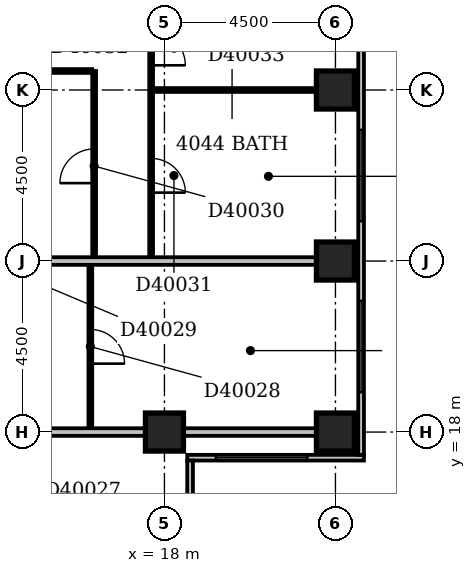
"""IFC4 building model, lengths in metres.
Left out: names, types, materials, properties, quantities, classifications, styles, units other than length and angle.
Written with IfcOpenShell. Run it as: python <this file> out.ifc"""

import sys

from ifc_helpers import new_model, si_unit, direction, frame, frame_2d, origin, origin_2d, place, context, subcontext, project, spatial, rectangle, extrude, element, fill, save


model = new_model("IFC4")
c1 = context("Model", 3, precision=1e-05, world=origin(), true_north=direction((0.0, 1.0)))
c2 = subcontext(c1, "Body", "Model", "MODEL_VIEW")
j1 = project(units=[si_unit("LENGTHUNIT", "METRE"), si_unit("PLANEANGLEUNIT", "RADIAN")], contexts=[c1])
p1 = place(None, origin())
s1 = spatial("IfcSite", under=j1, at=p1, CompositionType="ELEMENT")
p2 = place(p1, origin())
s2 = spatial("IfcBuilding", under=s1, at=p2, CompositionType="ELEMENT")
p3 = place(p2, frame((0.0, 0.0, 159.2)))
s3 = spatial("IfcBuildingStorey", under=s2, at=p3, CompositionType="ELEMENT", Elevation=159.2)
for number, where, z_axis, x_axis in (
    (1, (18.0, 18.0, -0.3), (0.0, 0.0, 1.0), (1.0, 0.0, 0.0)),
    (2, (22.5, 18.0, -0.3), (0.0, 0.0, 1.0), (1.0, 0.0, 0.0)),
    (3, (22.5, 22.5, -0.3), (0.0, 0.0, 1.0), (1.0, 0.0, 0.0)),
    (4, (22.5, 27.0, -0.3), (0.0, 0.0, 1.0), (1.0, 0.0, 0.0)),
):
    element("IfcColumn", number, at=place(p3, frame(where, z_axis=z_axis, x_axis=x_axis)), inside=s3, PredefinedType="COLUMN", context=c2, shape_type="SweptSolid", body=[
        extrude(rectangle(XDim=1.0, YDim=1.0, at=origin_2d()), origin(), (0.0, 0.0, 1.0), 3.6),
    ])
p4 = place(p3, frame((18.675, 8.4, 0.0), z_axis=(0.0, 0.0, 1.0), x_axis=(0.0, 1.0, 0.0)))
e5 = element("IfcWall", 5, at=p4, inside=s3, PredefinedType="STANDARD", context=c2, shape_type="SweptSolid", body=[
    extrude(rectangle(XDim=8.85, YDim=0.15, at=frame_2d((4.425, 0.0))), origin(), (0.0, 0.0, 1.0), 2.7),
])
p5 = place(p4, frame((1.65, 0.0, 0.6)))
e6 = element("IfcOpeningElement", 6, at=p5, cuts=e5, PredefinedType="OPENING", context=c2, shape_type="SweptSolid", body=[
    extrude(rectangle(XDim=2.4, YDim=1.8, at=frame_2d((1.2, 0.9))), frame((0.0, 0.087, 0.0), z_axis=(0.0, -1.0, 0.0), x_axis=(1.0, 0.0, 0.0)), (0.0, 0.0, 1.0), 0.174),
])
p6 = place(p4, frame((5.832, 0.0, 0.6)))
e7 = element("IfcOpeningElement", 7, at=p6, cuts=e5, PredefinedType="OPENING", context=c2, shape_type="SweptSolid", body=[
    extrude(rectangle(XDim=1.5, YDim=1.8, at=frame_2d((0.75, 0.9))), frame((0.0, 0.087, 0.0), z_axis=(0.0, -1.0, 0.0), x_axis=(1.0, 0.0, 0.0)), (0.0, 0.0, 1.0), 0.174),
])
p7 = place(p3, frame((18.6, 17.325, 0.0), z_axis=(0.0, 0.0, 1.0), x_axis=(1.0, 0.0, 0.0)))
e8 = element("IfcWall", 8, at=p7, inside=s3, PredefinedType="STANDARD", context=c2, shape_type="SweptSolid", body=[
    extrude(rectangle(XDim=4.65, YDim=0.15, at=frame_2d((2.325, 0.0))), origin(), (0.0, 0.0, 1.0), 2.7),
])
p8 = place(p7, frame((0.757, 0.0, 0.6)))
e9 = element("IfcOpeningElement", 9, at=p8, cuts=e8, PredefinedType="OPENING", context=c2, shape_type="SweptSolid", body=[
    extrude(rectangle(XDim=2.4, YDim=1.8, at=frame_2d((1.2, 0.9))), frame((0.0, 0.087, 0.0), z_axis=(0.0, -1.0, 0.0), x_axis=(1.0, 0.0, 0.0)), (0.0, 0.0, 1.0), 0.174),
])
p9 = place(p3, frame((23.175, 17.4, 0.0), z_axis=(0.0, 0.0, 1.0), x_axis=(0.0, 1.0, 0.0)))
e10 = element("IfcWall", 10, at=p9, inside=s3, PredefinedType="STANDARD", context=c2, shape_type="SweptSolid", body=[
    extrude(rectangle(XDim=17.85, YDim=0.15, at=frame_2d((8.925, 0.0))), origin(), (0.0, 0.0, 1.0), 2.7),
])
p10 = place(p9, frame((1.65, 0.0, 0.6)))
e11 = element("IfcOpeningElement", 11, at=p10, cuts=e10, PredefinedType="OPENING", context=c2, shape_type="SweptSolid", body=[
    extrude(rectangle(XDim=2.4, YDim=1.8, at=frame_2d((1.2, 0.9))), frame((0.0, 0.087, 0.0), z_axis=(0.0, -1.0, 0.0), x_axis=(1.0, 0.0, 0.0)), (0.0, 0.0, 1.0), 0.174),
])
p11 = place(p9, frame((6.15, 0.0, 0.6)))
e12 = element("IfcOpeningElement", 12, at=p11, cuts=e10, PredefinedType="OPENING", context=c2, shape_type="SweptSolid", body=[
    extrude(rectangle(XDim=2.4, YDim=1.8, at=frame_2d((1.2, 0.9))), frame((0.0, 0.087, 0.0), z_axis=(0.0, -1.0, 0.0), x_axis=(1.0, 0.0, 0.0)), (0.0, 0.0, 1.0), 0.174),
])
p12 = place(p9, frame((10.65, 0.0, 0.6)))
e13 = element("IfcOpeningElement", 13, at=p12, cuts=e10, PredefinedType="OPENING", context=c2, shape_type="SweptSolid", body=[
    extrude(rectangle(XDim=2.4, YDim=1.8, at=frame_2d((1.2, 0.9))), frame((0.0, 0.087, 0.0), z_axis=(0.0, -1.0, 0.0), x_axis=(1.0, 0.0, 0.0)), (0.0, 0.0, 1.0), 0.174),
])
p13 = place(p9, frame((14.82, 0.0, 0.6)))
e14 = element("IfcOpeningElement", 14, at=p13, cuts=e10, PredefinedType="OPENING", context=c2, shape_type="SweptSolid", body=[
    extrude(rectangle(XDim=0.45, YDim=1.8, at=frame_2d((0.225, 0.9))), frame((0.0, 0.087, 0.0), z_axis=(0.0, -1.0, 0.0), x_axis=(1.0, 0.0, 0.0)), (0.0, 0.0, 1.0), 0.174),
])
p14 = place(p3, frame((9.1, 18.0, 0.0), z_axis=(0.0, 0.0, 1.0), x_axis=(1.0, 0.0, 0.0)))
e15 = element("IfcWall", 15, at=p14, inside=s3, PredefinedType="PARTITIONING", context=c2, shape_type="SweptSolid", body=[
    extrude(rectangle(XDim=8.4, YDim=0.2, at=frame_2d((4.2, 0.0))), origin(), (0.0, 0.0, 1.0), 2.6),
])
p15 = place(p3, frame((18.5, 18.0, 0.0), z_axis=(0.0, 0.0, 1.0), x_axis=(1.0, 0.0, 0.0)))
e16 = element("IfcWall", 16, at=p15, inside=s3, PredefinedType="PARTITIONING", context=c2, shape_type="SweptSolid", body=[
    extrude(rectangle(XDim=3.5, YDim=0.2, at=frame_2d((1.75, 0.0))), origin(), (0.0, 0.0, 1.0), 2.7),
])
p16 = place(p3, frame((16.05, 18.1, 0.0), z_axis=(0.0, 0.0, 1.0), x_axis=(0.0, 1.0, 0.0)))
e17 = element("IfcWall", 17, at=p16, inside=s3, PredefinedType="PARTITIONING", context=c2, shape_type="SweptSolid", body=[
    extrude(rectangle(XDim=4.3, YDim=0.1, at=frame_2d((2.15, 0.0))), origin(), (0.0, 0.0, 1.0), 3.3),
])
p17 = place(p16, frame((1.7, 0.0, 0.0)))
e18 = element("IfcOpeningElement", 18, at=p17, cuts=e17, PredefinedType="OPENING", context=c2, shape_type="SweptSolid", body=[
    extrude(rectangle(XDim=0.9, YDim=2.1, at=frame_2d((0.45, 1.05))), frame((0.0, 0.062, 0.0), z_axis=(0.0, -1.0, 0.0), x_axis=(1.0, 0.0, 0.0)), (0.0, 0.0, 1.0), 0.124),
])
p18 = place(p3, frame((9.1, 22.5, 0.0), z_axis=(0.0, 0.0, 1.0), x_axis=(1.0, 0.0, 0.0)))
e19 = element("IfcWall", 19, at=p18, inside=s3, PredefinedType="PARTITIONING", context=c2, shape_type="SweptSolid", body=[
    extrude(rectangle(XDim=12.9, YDim=0.2, at=frame_2d((6.45, 0.0))), origin(), (0.0, 0.0, 1.0), 3.3),
])
p19 = place(p3, frame((16.15, 22.6, 0.0), z_axis=(0.0, 0.0, 1.0), x_axis=(0.0, 1.0, 0.0)))
e20 = element("IfcWall", 20, at=p19, inside=s3, PredefinedType="PARTITIONING", context=c2, shape_type="SweptSolid", body=[
    extrude(rectangle(XDim=4.9, YDim=0.1, at=frame_2d((2.45, 0.0))), origin(), (0.0, 0.0, 1.0), 3.3),
])
p20 = place(p19, frame((1.95, 0.0, 0.0)))
e21 = element("IfcOpeningElement", 21, at=p20, cuts=e20, PredefinedType="OPENING", context=c2, shape_type="SweptSolid", body=[
    extrude(rectangle(XDim=0.9, YDim=2.1, at=frame_2d((0.45, 1.05))), frame((0.0, 0.062, 0.0), z_axis=(0.0, -1.0, 0.0), x_axis=(1.0, 0.0, 0.0)), (0.0, 0.0, 1.0), 0.124),
])
p21 = place(p3, frame((17.65, 22.6, 0.0), z_axis=(0.0, 0.0, 1.0), x_axis=(0.0, 1.0, 0.0)))
e22 = element("IfcWall", 22, at=p21, inside=s3, PredefinedType="PARTITIONING", context=c2, shape_type="SweptSolid", body=[
    extrude(rectangle(XDim=8.8, YDim=0.1, at=frame_2d((4.4, 0.0))), origin(), (0.0, 0.0, 1.0), 3.3),
])
p22 = place(p21, frame((1.7, 0.0, 0.0)))
e23 = element("IfcOpeningElement", 23, at=p22, cuts=e22, PredefinedType="OPENING", context=c2, shape_type="SweptSolid", body=[
    extrude(rectangle(XDim=0.9, YDim=2.1, at=frame_2d((0.45, 1.05))), frame((0.0, 0.062, 0.0), z_axis=(0.0, -1.0, 0.0), x_axis=(1.0, 0.0, 0.0)), (0.0, 0.0, 1.0), 0.124),
])
p23 = place(p21, frame((5.05, 0.0, 0.0)))
e24 = element("IfcOpeningElement", 24, at=p23, cuts=e22, PredefinedType="OPENING", context=c2, shape_type="SweptSolid", body=[
    extrude(rectangle(XDim=0.9, YDim=2.1, at=frame_2d((0.45, 1.05))), frame((0.0, 0.062, 0.0), z_axis=(0.0, -1.0, 0.0), x_axis=(1.0, 0.0, 0.0)), (0.0, 0.0, 1.0), 0.124),
])
p24 = place(p3, frame((17.7, 27.0, 0.0), z_axis=(0.0, 0.0, 1.0), x_axis=(1.0, 0.0, 0.0)))
e25 = element("IfcWall", 25, at=p24, inside=s3, PredefinedType="PARTITIONING", context=c2, shape_type="SweptSolid", body=[
    extrude(rectangle(XDim=4.3, YDim=0.1, at=frame_2d((2.15, 0.0))), origin(), (0.0, 0.0, 1.0), 2.7),
])
p25 = place(p3, frame((9.1, 27.5, 0.0), z_axis=(0.0, 0.0, 1.0), x_axis=(1.0, 0.0, 0.0)))
e26 = element("IfcWall", 26, at=p25, inside=s3, PredefinedType="PARTITIONING", context=c2, shape_type="SweptSolid", body=[
    extrude(rectangle(XDim=7.0, YDim=0.1, at=frame_2d((3.5, 0.0))), origin(), (0.0, 0.0, 1.0), 2.7),
])
p26 = place(p8, origin())
e27 = element("IfcWindow", 27, at=p26, inside=s3, PartitioningType="SINGLE_PANEL", PredefinedType="WINDOW", context=c2, shape_type="SweptSolid", body=[
    extrude(rectangle(XDim=2.4, YDim=1.8, at=frame_2d((1.2, 0.9))), frame((0.0, 0.03, 0.0), z_axis=(0.0, -1.0, 0.0), x_axis=(1.0, 0.0, 0.0)), (0.0, 0.0, 1.0), 0.06),
])
fill(e9, e27)
p27 = place(p10, origin())
e28 = element("IfcWindow", 28, at=p27, inside=s3, PartitioningType="SINGLE_PANEL", PredefinedType="WINDOW", context=c2, shape_type="SweptSolid", body=[
    extrude(rectangle(XDim=2.4, YDim=1.8, at=frame_2d((1.2, 0.9))), frame((0.0, 0.03, 0.0), z_axis=(0.0, -1.0, 0.0), x_axis=(1.0, 0.0, 0.0)), (0.0, 0.0, 1.0), 0.06),
])
fill(e11, e28)
p28 = place(p11, origin())
e29 = element("IfcWindow", 29, at=p28, inside=s3, PartitioningType="SINGLE_PANEL", PredefinedType="WINDOW", context=c2, shape_type="SweptSolid", body=[
    extrude(rectangle(XDim=2.4, YDim=1.8, at=frame_2d((1.2, 0.9))), frame((0.0, 0.03, 0.0), z_axis=(0.0, -1.0, 0.0), x_axis=(1.0, 0.0, 0.0)), (0.0, 0.0, 1.0), 0.06),
])
fill(e12, e29)
p29 = place(p17, frame((0.9, 0.0, 0.0), z_axis=(0.0, 0.0, 1.0), x_axis=(-1.0, 0.0, 0.0)))
e30 = element("IfcDoor", 30, at=p29, inside=s3, OperationType="SINGLE_SWING_RIGHT", PredefinedType="DOOR", context=c2, shape_type="SweptSolid", body=[
    extrude(rectangle(XDim=0.9, YDim=2.1, at=frame_2d((0.45, 1.05))), frame((0.0, 0.025, 0.0), z_axis=(0.0, -1.0, 0.0), x_axis=(1.0, 0.0, 0.0)), (0.0, 0.0, 1.0), 0.05),
])
fill(e18, e30)
p30 = place(p20, origin())
e31 = element("IfcDoor", 31, at=p30, inside=s3, OperationType="SINGLE_SWING_LEFT", PredefinedType="DOOR", context=c2, shape_type="SweptSolid", body=[
    extrude(rectangle(XDim=0.9, YDim=2.1, at=frame_2d((0.45, 1.05))), frame((0.0, 0.025, 0.0), z_axis=(0.0, -1.0, 0.0), x_axis=(1.0, 0.0, 0.0)), (0.0, 0.0, 1.0), 0.05),
])
fill(e21, e31)
p31 = place(p22, frame((0.9, 0.0, 0.0), z_axis=(0.0, 0.0, 1.0), x_axis=(-1.0, 0.0, 0.0)))
e32 = element("IfcDoor", 32, at=p31, inside=s3, OperationType="SINGLE_SWING_RIGHT", PredefinedType="DOOR", context=c2, shape_type="SweptSolid", body=[
    extrude(rectangle(XDim=0.9, YDim=2.1, at=frame_2d((0.45, 1.05))), frame((0.0, 0.025, 0.0), z_axis=(0.0, -1.0, 0.0), x_axis=(1.0, 0.0, 0.0)), (0.0, 0.0, 1.0), 0.05),
])
fill(e23, e32)
p32 = place(p23, frame((0.9, 0.0, 0.0), z_axis=(0.0, 0.0, 1.0), x_axis=(-1.0, 0.0, 0.0)))
e33 = element("IfcDoor", 33, at=p32, inside=s3, OperationType="SINGLE_SWING_RIGHT", PredefinedType="DOOR", context=c2, shape_type="SweptSolid", body=[
    extrude(rectangle(XDim=0.9, YDim=2.1, at=frame_2d((0.45, 1.05))), frame((0.0, 0.025, 0.0), z_axis=(0.0, -1.0, 0.0), x_axis=(1.0, 0.0, 0.0)), (0.0, 0.0, 1.0), 0.05),
])
fill(e24, e33)
save(model, sys.argv[1])
